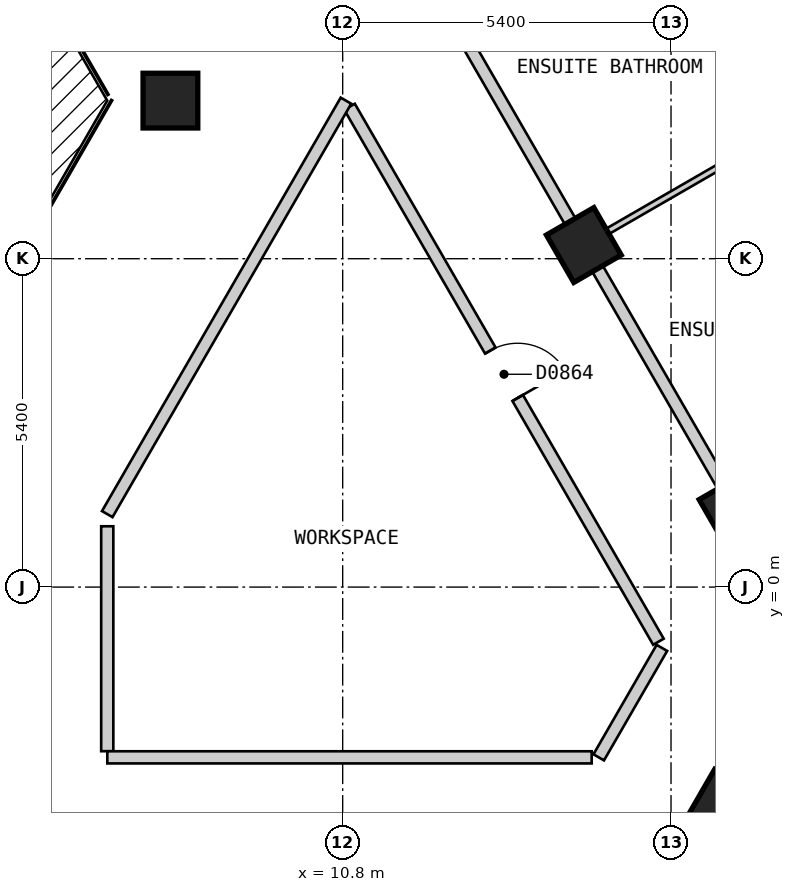
"""IFC4 building model, lengths in metres.
Left out: names, types, materials, properties, quantities, classifications, styles, units other than length and angle.
Written with IfcOpenShell. Run it as: python <this file> out.ifc"""

import sys

from ifc_helpers import new_model, si_unit, direction, frame, frame_2d, origin, origin_2d, place, context, subcontext, project, spatial, polyline, rectangle, outline, extrude, element, fill, save


model = new_model("IFC4")
c1 = context("Model", 3, precision=1e-05, world=origin(), true_north=direction((0.0, 1.0)))
c2 = subcontext(c1, "Body", "Model", "MODEL_VIEW")
j1 = project(units=[si_unit("LENGTHUNIT", "METRE"), si_unit("PLANEANGLEUNIT", "RADIAN")], contexts=[c1])
p1 = place(None, origin())
s1 = spatial("IfcSite", under=j1, at=p1, CompositionType="ELEMENT")
p2 = place(p1, origin())
s2 = spatial("IfcBuilding", under=s1, at=p2, CompositionType="ELEMENT")
p3 = place(p2, frame((0.0, 0.0, 84.0)))
s3 = spatial("IfcBuildingStorey", under=s2, at=p3, CompositionType="ELEMENT", Elevation=84.0)
for number, where, z_axis, x_axis in (
    (1, (17.083, -3.612, 0.0), (0.0, 0.0, 1.0), (0.5, 0.866, 0.0)),
    (2, (17.278, 1.274, 0.0), (0.0, 0.0, 1.0), (-0.5, 0.866, 0.0)),
    (3, (14.766, 5.625, 0.0), (0.0, 0.0, 1.0), (-0.5, 0.866, 0.0)),
    (4, (7.967, 8.0, 0.0), (0.0, 0.0, 1.0), (1.0, 0.0, 0.0)),
):
    element("IfcColumn", number, at=place(p3, frame(where, z_axis=z_axis, x_axis=x_axis)), inside=s3, PredefinedType="COLUMN", context=c2, shape_type="SweptSolid", body=[
        extrude(rectangle(XDim=0.9, YDim=0.9, at=origin_2d()), origin(), (0.0, 0.0, 1.0), 3.0),
    ])
p4 = place(p3, frame((29.027, 1.425, 0.0), z_axis=(0.0, 0.0, 1.0), x_axis=(-0.500027479704, 0.866009537788, 0.0)))
e5 = element("IfcWall", 5, at=p4, inside=s3, PredefinedType="SOLIDWALL", context=c2, shape_type="SweptSolid", body=[
    extrude(outline(polyline([(0.0, -0.15), (26.559, -0.15), (26.478, 0.15), (0.08, 0.15), (0.0, -0.15)])), origin(), (0.0, 0.0, 1.0), 2.7),
])
p5 = place(p4, frame((2.483, 0.0, 0.15)))
e6 = element("IfcOpeningElement", 6, at=p5, cuts=e5, PredefinedType="OPENING", context=c2, shape_type="SweptSolid", body=[
    extrude(rectangle(XDim=1.5, YDim=2.1, at=frame_2d((0.75, 1.05))), frame((0.0, 0.16, 0.0), z_axis=(0.0, -1.0, 0.0), x_axis=(1.0, 0.0, 0.0)), (0.0, 0.0, 1.0), 0.32),
])
p6 = place(p4, frame((7.506, 0.0, 0.15)))
e7 = element("IfcOpeningElement", 7, at=p6, cuts=e5, PredefinedType="OPENING", context=c2, shape_type="SweptSolid", body=[
    extrude(rectangle(XDim=1.5, YDim=2.1, at=frame_2d((0.75, 1.05))), frame((0.0, 0.16, 0.0), z_axis=(0.0, -1.0, 0.0), x_axis=(1.0, 0.0, 0.0)), (0.0, 0.0, 1.0), 0.32),
])
p7 = place(p4, frame((12.529, 0.0, 0.15)))
e8 = element("IfcOpeningElement", 8, at=p7, cuts=e5, PredefinedType="OPENING", context=c2, shape_type="SweptSolid", body=[
    extrude(rectangle(XDim=1.5, YDim=2.1, at=frame_2d((0.75, 1.05))), frame((0.0, 0.16, 0.0), z_axis=(0.0, -1.0, 0.0), x_axis=(1.0, 0.0, 0.0)), (0.0, 0.0, 1.0), 0.32),
])
p8 = place(p4, frame((17.552, 0.0, 0.15)))
e9 = element("IfcOpeningElement", 9, at=p8, cuts=e5, PredefinedType="OPENING", context=c2, shape_type="SweptSolid", body=[
    extrude(rectangle(XDim=1.5, YDim=2.1, at=frame_2d((0.75, 1.05))), frame((0.0, 0.16, 0.0), z_axis=(0.0, -1.0, 0.0), x_axis=(1.0, 0.0, 0.0)), (0.0, 0.0, 1.0), 0.32),
])
p9 = place(p4, frame((22.575, 0.0, 0.15)))
e10 = element("IfcOpeningElement", 10, at=p9, cuts=e5, PredefinedType="OPENING", context=c2, shape_type="SweptSolid", body=[
    extrude(rectangle(XDim=1.5, YDim=2.1, at=frame_2d((0.75, 1.05))), frame((0.0, 0.16, 0.0), z_axis=(0.0, -1.0, 0.0), x_axis=(1.0, 0.0, 0.0)), (0.0, 0.0, 1.0), 0.32),
])
p10 = place(p3, frame((10.913, 7.899, 0.0), z_axis=(0.0, 0.0, 1.0), x_axis=(0.500028940566, -0.866008694296, 0.0)))
e11 = element("IfcWall", 11, at=p10, inside=s3, PredefinedType="PARTITIONING", context=c2, shape_type="SweptSolid", body=[
    extrude(rectangle(XDim=10.159, YDim=0.2, at=frame_2d((5.08, 0.0))), origin(), (0.0, 0.0, 1.0), 2.7),
])
p11 = place(p10, frame((4.63, 0.0, 0.0)))
e12 = element("IfcOpeningElement", 12, at=p11, cuts=e11, PredefinedType="OPENING", context=c2, shape_type="SweptSolid", body=[
    extrude(rectangle(XDim=0.9, YDim=2.1, at=frame_2d((0.45, 1.05))), frame((0.0, 0.11, 0.0), z_axis=(0.0, -1.0, 0.0), x_axis=(1.0, 0.0, 0.0)), (0.0, 0.0, 1.0), 0.22),
])
p12 = place(p3, frame((8.488, 16.5, 0.0), z_axis=(0.0, 0.0, 1.0), x_axis=(0.499986836607, -0.86603300354, 0.0)))
e13 = element("IfcWall", 13, at=p12, inside=s3, PredefinedType="PARTITIONING", context=c2, shape_type="SweptSolid", body=[
    extrude(rectangle(XDim=20.09, YDim=0.2, at=frame_2d((10.045, 0.0))), origin(), (0.0, 0.0, 1.0), 2.7),
])
p13 = place(p12, frame((4.523, 0.0, 0.0)))
e14 = element("IfcOpeningElement", 14, at=p13, cuts=e13, PredefinedType="OPENING", context=c2, shape_type="SweptSolid", body=[
    extrude(rectangle(XDim=1.0, YDim=2.1, at=frame_2d((0.5, 1.05))), frame((0.0, 0.11, 0.0), z_axis=(0.0, -1.0, 0.0), x_axis=(1.0, 0.0, 0.0)), (0.0, 0.0, 1.0), 0.22),
])
p14 = place(p3, frame((6.928, 1.0, 0.0), z_axis=(0.0, 0.0, 1.0), x_axis=(0.0, -1.0, 0.0)))
e15 = element("IfcWall", 15, at=p14, inside=s3, PredefinedType="PARTITIONING", context=c2, shape_type="SweptSolid", body=[
    extrude(rectangle(XDim=3.699, YDim=0.2, at=frame_2d((1.85, 0.0))), origin(), (0.0, 0.0, 1.0), 2.7),
])
p15 = place(p3, frame((6.929, -2.8, 0.0), z_axis=(0.0, 0.0, 1.0), x_axis=(1.0, 0.0, 0.0)))
e16 = element("IfcWall", 16, at=p15, inside=s3, PredefinedType="PARTITIONING", context=c2, shape_type="SweptSolid", body=[
    extrude(rectangle(XDim=7.966, YDim=0.2, at=frame_2d((3.983, 0.0))), origin(), (0.0, 0.0, 1.0), 2.7),
])
p16 = place(p3, frame((6.928, 1.2, 0.0), z_axis=(0.0, 0.0, 1.0), x_axis=(0.500055327065, 0.865993458332, 0.0)))
e17 = element("IfcWall", 17, at=p16, inside=s3, PredefinedType="PARTITIONING", context=c2, shape_type="SweptSolid", body=[
    extrude(rectangle(XDim=7.851, YDim=0.2, at=frame_2d((3.926, 0.0))), origin(), (0.0, 0.0, 1.0), 2.7),
])
p17 = place(p3, frame((15.011, -2.8, 0.0), z_axis=(0.0, 0.0, 1.0), x_axis=(0.499929208183, 0.866066271601, 0.0)))
e18 = element("IfcWall", 18, at=p17, inside=s3, PredefinedType="PARTITIONING", context=c2, shape_type="SweptSolid", body=[
    extrude(rectangle(XDim=2.078, YDim=0.2, at=frame_2d((1.039, 0.0))), origin(), (0.0, 0.0, 1.0), 2.7),
])
p18 = place(p3, frame((15.771, -5.884, 0.0), z_axis=(0.0, 0.0, 1.0), x_axis=(0.499939494019, 0.866060334111, 0.0)))
e19 = element("IfcWall", 19, at=p18, inside=s3, PredefinedType="PARTITIONING", context=c2, shape_type="SweptSolid", body=[
    extrude(rectangle(XDim=5.583, YDim=0.2, at=frame_2d((2.792, 0.0))), origin(), (0.0, 0.0, 1.0), 2.7),
])
p19 = place(p18, frame((3.647, 0.0, 0.0)))
e20 = element("IfcOpeningElement", 20, at=p19, cuts=e19, PredefinedType="OPENING", context=c2, shape_type="SweptSolid", body=[
    extrude(rectangle(XDim=1.0, YDim=2.1, at=frame_2d((0.5, 1.05))), frame((0.0, 0.11, 0.0), z_axis=(0.0, -1.0, 0.0), x_axis=(1.0, 0.0, 0.0)), (0.0, 0.0, 1.0), 0.22),
])
p20 = place(p3, frame((15.398, 11.731, 0.0), z_axis=(0.0, 0.0, 1.0), x_axis=(0.500010064822, -0.866019592779, 0.0)))
e21 = element("IfcWall", 21, at=p20, inside=s3, PredefinedType="PARTITIONING", context=c2, shape_type="SweptSolid", body=[
    extrude(rectangle(XDim=4.972, YDim=0.1, at=frame_2d((2.486, 0.0))), origin(), (0.0, 0.0, 1.0), 2.7),
])
p21 = place(p20, frame((2.061, 0.0, 0.0)))
e22 = element("IfcOpeningElement", 22, at=p21, cuts=e21, PredefinedType="OPENING", context=c2, shape_type="SweptSolid", body=[
    extrude(rectangle(XDim=0.8, YDim=2.1, at=frame_2d((0.4, 1.05))), frame((0.0, 0.06, 0.0), z_axis=(0.0, -1.0, 0.0), x_axis=(1.0, 0.0, 0.0)), (0.0, 0.0, 1.0), 0.12),
])
p22 = place(p3, frame((14.853, 5.675, 0.0), z_axis=(0.0, 0.0, 1.0), x_axis=(0.866016855193, 0.500014806302, 0.0)))
e23 = element("IfcWall", 23, at=p22, inside=s3, PredefinedType="PARTITIONING", context=c2, shape_type="SweptSolid", body=[
    extrude(rectangle(XDim=10.0, YDim=0.1, at=frame_2d((5.0, 0.0))), origin(), (0.0, 0.0, 1.0), 2.7),
])
p23 = place(p22, frame((6.3, 0.0, 0.0)))
e24 = element("IfcOpeningElement", 24, at=p23, cuts=e23, PredefinedType="OPENING", context=c2, shape_type="SweptSolid", body=[
    extrude(rectangle(XDim=0.9, YDim=2.1, at=frame_2d((0.45, 1.05))), frame((0.0, 0.06, 0.0), z_axis=(0.0, -1.0, 0.0), x_axis=(1.0, 0.0, 0.0)), (0.0, 0.0, 1.0), 0.12),
])
p24 = place(p11, origin())
e25 = element("IfcDoor", 25, at=p24, inside=s3, OperationType="SINGLE_SWING_RIGHT", PredefinedType="DOOR", context=c2, shape_type="SweptSolid", body=[
    extrude(rectangle(XDim=0.9, YDim=2.1, at=frame_2d((0.45, 1.05))), frame((0.0, 0.025, 0.0), z_axis=(0.0, -1.0, 0.0), x_axis=(1.0, 0.0, 0.0)), (0.0, 0.0, 1.0), 0.05),
])
fill(e12, e25)
save(model, sys.argv[1])
